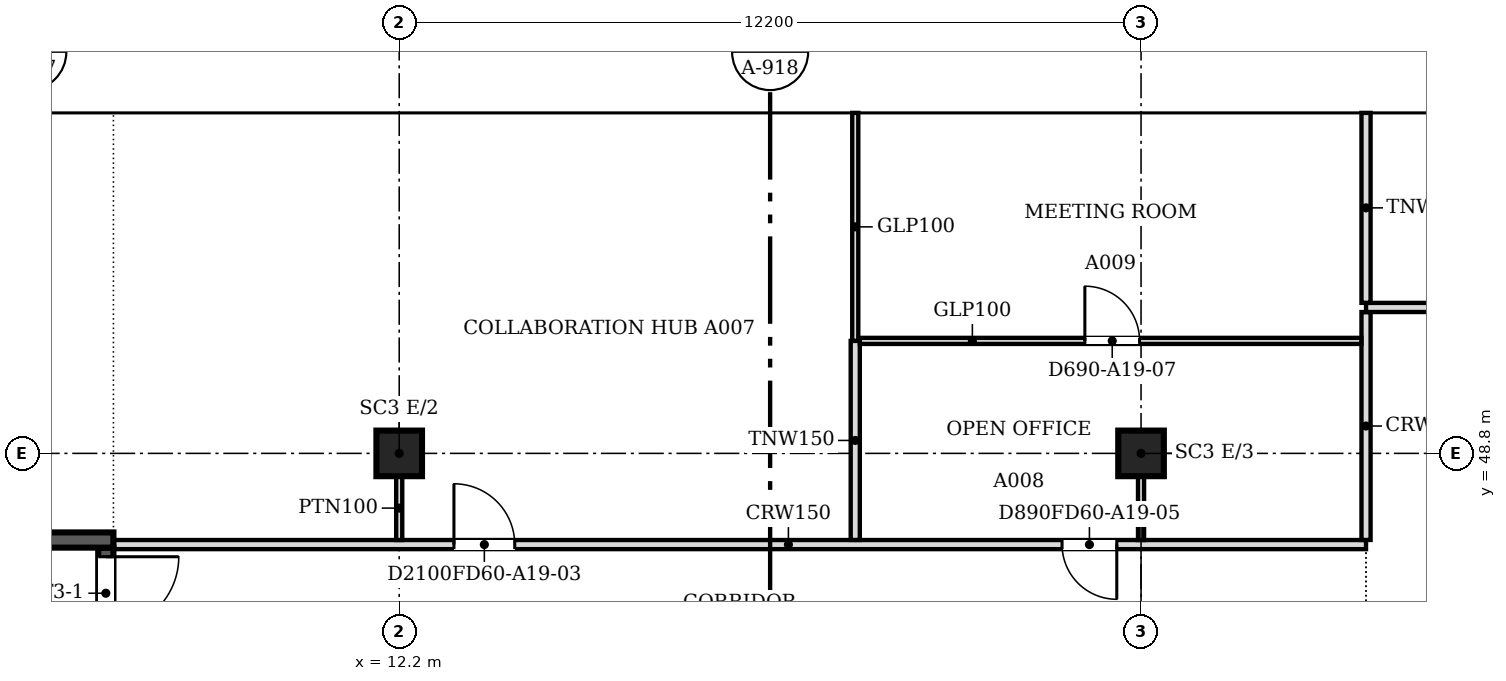
"""IFC4 building model, lengths in metres.
Left out: names, types, materials, properties, quantities, classifications, styles, units other than length and angle.
Written with IfcOpenShell. Run it as: python <this file> out.ifc"""

import sys

from ifc_helpers import new_model, si_unit, direction, frame, frame_2d, origin, origin_2d, place, context, subcontext, project, spatial, polyline, rectangle, outline, extrude, faceted_brep, source, transform, mapped, element, fill, save


model = new_model("IFC4")
c1 = context("Model", 3, precision=1e-05, world=origin(), true_north=direction((0.0, 1.0)))
c2 = subcontext(c1, "Body", "Model", "MODEL_VIEW")
j1 = project(units=[si_unit("LENGTHUNIT", "METRE"), si_unit("PLANEANGLEUNIT", "RADIAN")], contexts=[c1])
p1 = place(None, origin())
s1 = spatial("IfcSite", under=j1, at=p1, CompositionType="ELEMENT")
p2 = place(p1, origin())
s2 = spatial("IfcBuilding", under=s1, at=p2, CompositionType="ELEMENT")
p3 = place(p2, frame((0.0, 0.0, 209.3)))
s3 = spatial("IfcBuildingStorey", under=s2, at=p3, CompositionType="ELEMENT", Elevation=209.3)
for number, where, z_axis, x_axis in (
    (1, (12.2, 48.8, 0.0), (0.0, 0.0, 1.0), (1.0, 0.0, 0.0)),
    (2, (24.4, 48.8, 0.0), (0.0, 0.0, 1.0), (1.0, 0.0, 0.0)),
):
    element("IfcColumn", number, at=place(p3, frame(where, z_axis=z_axis, x_axis=x_axis)), inside=s3, PredefinedType="COLUMN", context=c2, shape_type="SweptSolid", body=[
        extrude(rectangle(XDim=0.75, YDim=0.75, at=origin_2d()), origin(), (0.0, 0.0, 1.0), 3.6),
    ])
m1 = source(origin(), c2, "Body", "SweptSolid", [
    extrude(outline(polyline([(3.05, 0.0), (6.1, 3.8), (3.05, 7.6), (0.0, 3.8), (3.05, 0.0)])), frame((0.0, 0.25, 0.0), z_axis=(0.0, -1.0, 0.0), x_axis=(1.0, 0.0, 0.0)), (0.0, 0.0, 1.0), 0.5),
])
p4 = place(p3, frame((30.5, 54.65, -3.8), z_axis=(0.0, 0.0, 1.0), x_axis=(-1.0, 0.0, 0.0)))
e3 = element("IfcWall", 3, at=p4, inside=s3, PredefinedType="SOLIDWALL", context=c2, shape_type="MappedRepresentation", body=[
    mapped(m1, transform((0.0, 0.0, 0.0), scale=1.0)),
])
m2 = source(origin(), c2, "Body", "SweptSolid", [
    extrude(outline(polyline([(3.05, 0.399), (5.78, 3.8), (3.05, 7.201), (0.321, 3.8), (3.05, 0.399)])), frame((0.0, 0.26, 0.0), z_axis=(0.0, -1.0, 0.0), x_axis=(1.0, 0.0, 0.0)), (0.0, 0.0, 1.0), 0.52),
])
p5 = place(p4, origin())
e4 = element("IfcOpeningElement", 4, at=p5, cuts=e3, PredefinedType="OPENING", context=c2, shape_type="MappedRepresentation", body=[
    mapped(m2, transform((0.0, 0.0, 0.0), scale=1.0)),
])
m3 = source(origin(), c2, "Body", "Brep", [
    faceted_brep([(3.05, -0.25, 0.0), (6.1, -0.25, 3.8), (6.1, -0.25, 3.8), (3.05, -0.25, 7.6), (0.0, -0.25, 3.8), (0.0, 0.25, 3.8), (3.05, 0.25, 7.6), (6.1, 0.25, 3.8), (6.1, 0.25, 3.8), (3.05, 0.25, 0.0)], [[[0, 1, 2, 3, 4]], [[5, 6, 7, 8, 9]], [[9, 8, 1, 0]], [[7, 6, 3, 2]], [[6, 5, 4, 3]], [[5, 9, 0, 4]], [[1, 8, 7, 2]]]),
])
p6 = place(p3, frame((24.4, 54.65, -3.8), z_axis=(0.0, 0.0, 1.0), x_axis=(-1.0, 0.0, 0.0)))
e5 = element("IfcWall", 5, at=p6, inside=s3, PredefinedType="SOLIDWALL", context=c2, shape_type="MappedRepresentation", body=[
    mapped(m3, transform((0.0, 0.0, 0.0), scale=1.0)),
])
p7 = place(p6, origin())
e6 = element("IfcOpeningElement", 6, at=p7, cuts=e5, PredefinedType="OPENING", context=c2, shape_type="MappedRepresentation", body=[
    mapped(m2, transform((0.0, 0.0, 0.0), scale=1.0)),
])
p8 = place(p3, frame((18.3, 54.65, -3.8), z_axis=(0.0, 0.0, 1.0), x_axis=(-1.0, 0.0, 0.0)))
e7 = element("IfcWall", 7, at=p8, inside=s3, PredefinedType="SOLIDWALL", context=c2, shape_type="MappedRepresentation", body=[
    mapped(m1, transform((0.0, 0.0, 0.0), scale=1.0)),
])
p9 = place(p8, origin())
e8 = element("IfcOpeningElement", 8, at=p9, cuts=e7, PredefinedType="OPENING", context=c2, shape_type="MappedRepresentation", body=[
    mapped(m2, transform((0.0, 0.0, 0.0), scale=1.0)),
])
m4 = source(origin(), c2, "Body", "Brep", [
    faceted_brep([(3.05, -0.25, 0.0), (6.053, -0.25, 3.8), (3.05, -0.25, 7.6), (0.0, -0.25, 3.8), (0.0, 0.25, 3.8), (3.05, 0.25, 7.6), (6.007, 0.25, 3.859), (6.007, 0.25, 3.741), (3.05, 0.25, 0.0), (6.053, 0.0, 3.8)], [[[0, 1, 2, 3]], [[4, 5, 6, 7, 8]], [[8, 7, 9, 1, 0]], [[6, 5, 2, 1, 9]], [[5, 4, 3, 2]], [[4, 8, 0, 3]], [[9, 7, 6]]]),
])
p10 = place(p3, frame((12.2, 54.65, -3.8), z_axis=(0.0, 0.0, 1.0), x_axis=(-1.0, 0.0, 0.0)))
e9 = element("IfcWall", 9, at=p10, inside=s3, PredefinedType="SOLIDWALL", context=c2, shape_type="MappedRepresentation", body=[
    mapped(m4, transform((0.0, 0.0, 0.0), scale=1.0)),
])
m5 = source(origin(), c2, "Body", "SweptSolid", [
    extrude(outline(polyline([(3.049, 0.401), (5.735, 3.8), (3.049, 7.199), (0.321, 3.8), (3.049, 0.401)])), frame((0.0, 0.26, 0.0), z_axis=(0.0, -1.0, 0.0), x_axis=(1.0, 0.0, 0.0)), (0.0, 0.0, 1.0), 0.52),
])
p11 = place(p10, origin())
e10 = element("IfcOpeningElement", 10, at=p11, cuts=e9, PredefinedType="OPENING", context=c2, shape_type="MappedRepresentation", body=[
    mapped(m5, transform((0.0, 0.0, 0.0), scale=1.0)),
])
p12 = place(p2, frame((0.0, 0.0, 213.1)))
s4 = spatial("IfcBuildingStorey", under=s2, at=p12, CompositionType="ELEMENT", Elevation=213.1)
m6 = source(origin(), c2, "Body", "SweptSolid", [
    extrude(outline(polyline([(3.05, 0.0), (6.1, 3.8), (3.05, 7.6), (0.0, 3.8), (3.05, 0.0)])), frame((0.0, 0.25, 0.0), z_axis=(0.0, -1.0, 0.0), x_axis=(1.0, 0.0, 0.0)), (0.0, 0.0, 1.0), 0.5),
])
p13 = place(p12, frame((33.55, 54.65, -3.8), z_axis=(0.0, 0.0, 1.0), x_axis=(-1.0, 0.0, 0.0)))
e11 = element("IfcWall", 11, at=p13, inside=s4, PredefinedType="SOLIDWALL", context=c2, shape_type="MappedRepresentation", body=[
    mapped(m6, transform((0.0, 0.0, 0.0), scale=1.0)),
])
m7 = source(origin(), c2, "Body", "SweptSolid", [
    extrude(outline(polyline([(3.05, 0.399), (5.78, 3.8), (3.05, 7.2), (0.321, 3.8), (3.05, 0.399)])), frame((0.0, 0.26, 0.0), z_axis=(0.0, -1.0, 0.0), x_axis=(1.0, 0.0, 0.0)), (0.0, 0.0, 1.0), 0.52),
])
p14 = place(p13, origin())
e12 = element("IfcOpeningElement", 12, at=p14, cuts=e11, PredefinedType="OPENING", context=c2, shape_type="MappedRepresentation", body=[
    mapped(m7, transform((0.0, 0.0, 0.0), scale=1.0)),
])
m8 = source(origin(), c2, "Body", "Brep", [
    faceted_brep([(3.05, -0.25, 0.0), (6.1, -0.25, 3.8), (6.1, -0.25, 3.8), (3.05, -0.25, 7.6), (0.0, -0.25, 3.8), (0.0, 0.25, 3.8), (3.05, 0.25, 7.6), (6.1, 0.25, 3.8), (6.1, 0.25, 3.8), (3.05, 0.25, 0.0)], [[[0, 1, 2, 3, 4]], [[5, 6, 7, 8, 9]], [[9, 8, 1, 0]], [[7, 6, 3, 2]], [[6, 5, 4, 3]], [[5, 9, 0, 4]], [[1, 8, 7, 2]]]),
])
p15 = place(p12, frame((27.45, 54.65, -3.8), z_axis=(0.0, 0.0, 1.0), x_axis=(-1.0, 0.0, 0.0)))
e13 = element("IfcWall", 13, at=p15, inside=s4, PredefinedType="SOLIDWALL", context=c2, shape_type="MappedRepresentation", body=[
    mapped(m8, transform((0.0, 0.0, 0.0), scale=1.0)),
])
p16 = place(p15, origin())
e14 = element("IfcOpeningElement", 14, at=p16, cuts=e13, PredefinedType="OPENING", context=c2, shape_type="MappedRepresentation", body=[
    mapped(m7, transform((0.0, 0.0, 0.0), scale=1.0)),
])
p17 = place(p12, frame((21.35, 54.65, -3.8), z_axis=(0.0, 0.0, 1.0), x_axis=(-1.0, 0.0, 0.0)))
e15 = element("IfcWall", 15, at=p17, inside=s4, PredefinedType="SOLIDWALL", context=c2, shape_type="MappedRepresentation", body=[
    mapped(m6, transform((0.0, 0.0, 0.0), scale=1.0)),
])
p18 = place(p17, origin())
e16 = element("IfcOpeningElement", 16, at=p18, cuts=e15, PredefinedType="OPENING", context=c2, shape_type="MappedRepresentation", body=[
    mapped(m7, transform((0.0, 0.0, 0.0), scale=1.0)),
])
p19 = place(p12, frame((15.25, 54.65, -3.8), z_axis=(0.0, 0.0, 1.0), x_axis=(-1.0, 0.0, 0.0)))
e17 = element("IfcWall", 17, at=p19, inside=s4, PredefinedType="SOLIDWALL", context=c2, shape_type="MappedRepresentation", body=[
    mapped(m6, transform((0.0, 0.0, 0.0), scale=1.0)),
])
p20 = place(p19, origin())
e18 = element("IfcOpeningElement", 18, at=p20, cuts=e17, PredefinedType="OPENING", context=c2, shape_type="MappedRepresentation", body=[
    mapped(m7, transform((0.0, 0.0, 0.0), scale=1.0)),
])
m9 = source(origin(), c2, "Body", "Brep", [
    faceted_brep([(3.003, -0.25, 0.0), (3.05, -0.25, 0.06), (3.05, -0.25, 7.54), (3.003, -0.25, 7.6), (0.0, -0.25, 3.8), (0.0, 0.25, 3.8), (2.957, 0.25, 7.541), (2.957, 0.25, 0.059), (3.003, 0.0, 0.0), (3.003, 0.0, 7.6)], [[[0, 1, 2, 3, 4]], [[5, 6, 7]], [[1, 0, 8]], [[9, 3, 2]], [[6, 5, 4, 3, 9]], [[5, 7, 8, 0, 4]], [[1, 8, 7, 6, 9, 2]]]),
])
p21 = place(p12, frame((9.15, 54.65, -3.8), z_axis=(0.0, 0.0, 1.0), x_axis=(-1.0, 0.0, 0.0)))
e19 = element("IfcWall", 19, at=p21, inside=s4, PredefinedType="SOLIDWALL", context=c2, shape_type="MappedRepresentation", body=[
    mapped(m9, transform((0.0, 0.0, 0.0), scale=1.0)),
])
m10 = source(origin(), c2, "Body", "SweptSolid", [
    extrude(outline(polyline([(2.803, 6.944), (0.319, 3.8), (2.803, 0.656), (2.803, 6.944)])), frame((0.0, 0.26, 0.0), z_axis=(0.0, -1.0, 0.0), x_axis=(1.0, 0.0, 0.0)), (0.0, 0.0, 1.0), 0.52),
])
p22 = place(p21, origin())
e20 = element("IfcOpeningElement", 20, at=p22, cuts=e19, PredefinedType="OPENING", context=c2, shape_type="MappedRepresentation", body=[
    mapped(m10, transform((0.0, 0.0, 0.0), scale=1.0)),
])
p23 = place(p3, frame((3.6, 47.375, 0.0), z_axis=(0.0, 0.0, 1.0), x_axis=(1.0, 0.0, 0.0)))
e21 = element("IfcWall", 21, at=p23, inside=s3, PredefinedType="SOLIDWALL", context=c2, shape_type="SweptSolid", body=[
    extrude(rectangle(XDim=3.9, YDim=0.25, at=frame_2d((1.95, 0.0))), origin(), (0.0, 0.0, 1.0), 3.8),
])
p24 = place(p3, frame((7.375, 47.25, 0.0), z_axis=(0.0, 0.0, 1.0), x_axis=(0.0, -1.0, 0.0)))
e22 = element("IfcWall", 22, at=p24, inside=s3, PredefinedType="SOLIDWALL", context=c2, shape_type="SweptSolid", body=[
    extrude(rectangle(XDim=8.0, YDim=0.25, at=frame_2d((4.0, 0.0))), origin(), (0.0, 0.0, 1.0), 3.8),
])
m11 = source(origin(), c2, "Body", "SweptSolid", [
    extrude(rectangle(XDim=1.2, YDim=2.1, at=frame_2d((0.6, 1.05))), frame((0.0, 0.135, 0.0), z_axis=(0.0, -1.0, 0.0), x_axis=(1.0, 0.0, 0.0)), (0.0, 0.0, 1.0), 0.27),
])
p25 = place(p24, frame((0.15, 0.0, 0.0)))
e23 = element("IfcOpeningElement", 23, at=p25, cuts=e22, PredefinedType="OPENING", context=c2, shape_type="MappedRepresentation", body=[
    mapped(m11, transform((0.0, 0.0, 0.0), scale=1.0)),
])
p26 = place(p3, frame((7.5, 47.3, 0.0), z_axis=(0.0, 0.0, 1.0), x_axis=(1.0, 0.0, 0.0)))
e24 = element("IfcWall", 24, at=p26, inside=s3, PredefinedType="PARTITIONING", context=c2, shape_type="SweptSolid", body=[
    extrude(rectangle(XDim=20.6, YDim=0.15, at=frame_2d((10.3, 0.0))), origin(), (0.0, 0.0, 1.0), 3.067),
])
m12 = source(origin(), c2, "Body", "SweptSolid", [
    extrude(rectangle(XDim=0.9, YDim=2.1, at=frame_2d((0.45, 1.05))), frame((0.0, 0.085, 0.0), z_axis=(0.0, -1.0, 0.0), x_axis=(1.0, 0.0, 0.0)), (0.0, 0.0, 1.0), 0.17),
])
p27 = place(p26, frame((15.601, 0.0, 0.0)))
e25 = element("IfcOpeningElement", 25, at=p27, cuts=e24, PredefinedType="OPENING", context=c2, shape_type="MappedRepresentation", body=[
    mapped(m12, transform((0.0, 0.0, 0.0), scale=1.0)),
])
m13 = source(origin(), c2, "Body", "SweptSolid", [
    extrude(rectangle(XDim=1.0, YDim=2.1, at=frame_2d((0.5, 1.05))), frame((0.0, 0.085, 0.0), z_axis=(0.0, -1.0, 0.0), x_axis=(1.0, 0.0, 0.0)), (0.0, 0.0, 1.0), 0.17),
])
p28 = place(p26, frame((5.6, 0.0, 0.0)))
e26 = element("IfcOpeningElement", 26, at=p28, cuts=e24, PredefinedType="OPENING", context=c2, shape_type="MappedRepresentation", body=[
    mapped(m13, transform((0.0, 0.0, 0.0), scale=1.0)),
])
p29 = place(p3, frame((19.7, 47.376, 0.0), z_axis=(0.0, 0.0, 1.0), x_axis=(0.0, 1.0, 0.0)))
e27 = element("IfcWall", 27, at=p29, inside=s3, PredefinedType="PARTITIONING", context=c2, shape_type="SweptSolid", body=[
    extrude(rectangle(XDim=3.274, YDim=0.15, at=frame_2d((1.637, 0.0))), origin(), (0.0, 0.0, 1.0), 3.067),
])
p30 = place(p3, frame((28.1, 47.376, 0.0), z_axis=(0.0, 0.0, 1.0), x_axis=(0.0, 1.0, 0.0)))
e28 = element("IfcWall", 28, at=p30, inside=s3, PredefinedType="PARTITIONING", context=c2, shape_type="SweptSolid", body=[
    extrude(rectangle(XDim=3.748, YDim=0.15, at=frame_2d((1.874, 0.0))), origin(), (0.0, 0.0, 1.0), 3.067),
])
for number, where, z_axis, x_axis in (
    (29, (12.2, 48.425, 0.0), (0.0, 0.0, 1.0), (0.0, -1.0, 0.0)),
    (30, (24.4, 48.425, 0.0), (0.0, 0.0, 1.0), (0.0, -1.0, 0.0)),
):
    element("IfcWall", number, at=place(p3, frame(where, z_axis=z_axis, x_axis=x_axis)), inside=s3, PredefinedType="PARTITIONING", context=c2, shape_type="SweptSolid", body=[
        extrude(rectangle(XDim=1.05, YDim=0.1, at=frame_2d((0.525, 0.0))), origin(), (0.0, 0.0, 1.0), 3.067),
    ])
p31 = place(p3, frame((19.7, 50.651, 0.0), z_axis=(0.0, 0.0, 1.0), x_axis=(0.0, 1.0, 0.0)))
e31 = element("IfcWall", 31, at=p31, inside=s3, PredefinedType="PARTITIONING", context=c2, shape_type="SweptSolid", body=[
    extrude(rectangle(XDim=3.749, YDim=0.1, at=frame_2d((1.875, 0.0))), origin(), (0.0, 0.0, 1.0), 3.067),
])
p32 = place(p3, frame((19.776, 50.65, 0.0), z_axis=(0.0, 0.0, 1.0), x_axis=(1.0, 0.0, 0.0)))
e32 = element("IfcWall", 32, at=p32, inside=s3, PredefinedType="PARTITIONING", context=c2, shape_type="SweptSolid", body=[
    extrude(rectangle(XDim=8.248, YDim=0.1, at=frame_2d((4.124, 0.0))), origin(), (0.0, 0.0, 1.0), 3.067),
])
m14 = source(origin(), c2, "Body", "SweptSolid", [
    extrude(rectangle(XDim=0.9, YDim=2.1, at=frame_2d((0.45, 1.05))), frame((0.0, 0.06, 0.0), z_axis=(0.0, -1.0, 0.0), x_axis=(1.0, 0.0, 0.0)), (0.0, 0.0, 1.0), 0.12),
])
p33 = place(p32, frame((3.7, 0.0, 0.0)))
e33 = element("IfcOpeningElement", 33, at=p33, cuts=e32, PredefinedType="OPENING", context=c2, shape_type="MappedRepresentation", body=[
    mapped(m14, transform((0.0, 0.0, 0.0), scale=1.0)),
])
p34 = place(p3, frame((28.1, 51.2, 0.0), z_axis=(0.0, 0.0, 1.0), x_axis=(1.0, 0.0, 0.0)))
e34 = element("IfcWall", 34, at=p34, inside=s3, PredefinedType="PARTITIONING", context=c2, shape_type="SweptSolid", body=[
    extrude(rectangle(XDim=31.438, YDim=0.15, at=frame_2d((15.719, 0.0))), origin(), (0.0, 0.0, 1.0), 3.067),
])
p35 = place(p34, frame((27.501, 0.0, 0.0)))
e35 = element("IfcOpeningElement", 35, at=p35, cuts=e34, PredefinedType="OPENING", context=c2, shape_type="MappedRepresentation", body=[
    mapped(m12, transform((0.0, 0.0, 0.0), scale=1.0)),
])
p36 = place(p34, frame((5.6, 0.0, 0.0)))
e36 = element("IfcOpeningElement", 36, at=p36, cuts=e34, PredefinedType="OPENING", context=c2, shape_type="MappedRepresentation", body=[
    mapped(m12, transform((0.0, 0.0, 0.0), scale=1.0)),
])
p37 = place(p34, frame((17.8, 0.0, 0.0)))
e37 = element("IfcOpeningElement", 37, at=p37, cuts=e34, PredefinedType="OPENING", context=c2, shape_type="MappedRepresentation", body=[
    mapped(m12, transform((0.0, 0.0, 0.0), scale=1.0)),
])
p38 = place(p3, frame((28.1, 51.276, 0.0), z_axis=(0.0, 0.0, 1.0), x_axis=(0.0, 1.0, 0.0)))
e38 = element("IfcWall", 38, at=p38, inside=s3, PredefinedType="PARTITIONING", context=c2, shape_type="SweptSolid", body=[
    extrude(rectangle(XDim=3.124, YDim=0.15, at=frame_2d((1.562, 0.0))), origin(), (0.0, 0.0, 1.0), 3.067),
])
m15 = source(origin(), c2, "Body", "SweptSolid", [
    extrude(rectangle(XDim=1.2, YDim=2.1, at=frame_2d((0.6, 1.05))), frame((0.0, 0.025, 0.0), z_axis=(0.0, -1.0, 0.0), x_axis=(1.0, 0.0, 0.0)), (0.0, 0.0, 1.0), 0.05),
])
p39 = place(p25, origin())
e39 = element("IfcDoor", 39, at=p39, inside=s3, OperationType="SINGLE_SWING_LEFT", PredefinedType="DOOR", context=c2, shape_type="MappedRepresentation", body=[
    mapped(m15, transform((0.0, 0.0, 0.0), scale=1.0)),
])
fill(e23, e39)
m16 = source(origin(), c2, "Body", "SweptSolid", [
    extrude(rectangle(XDim=0.9, YDim=2.1, at=frame_2d((0.45, 1.05))), frame((0.0, 0.025, 0.0), z_axis=(0.0, -1.0, 0.0), x_axis=(1.0, 0.0, 0.0)), (0.0, 0.0, 1.0), 0.05),
])
p40 = place(p33, origin())
e40 = element("IfcDoor", 40, at=p40, inside=s3, OperationType="SINGLE_SWING_LEFT", PredefinedType="DOOR", context=c2, shape_type="MappedRepresentation", body=[
    mapped(m16, transform((0.0, 0.0, 0.0), scale=1.0)),
])
fill(e33, e40)
p41 = place(p27, origin())
e41 = element("IfcDoor", 41, at=p41, inside=s3, OperationType="SINGLE_SWING_RIGHT", PredefinedType="DOOR", context=c2, shape_type="MappedRepresentation", body=[
    mapped(m16, transform((0.0, 0.0, 0.0), scale=1.0)),
])
fill(e25, e41)
m17 = source(origin(), c2, "Body", "SweptSolid", [
    extrude(rectangle(XDim=1.0, YDim=2.1, at=frame_2d((0.5, 1.05))), frame((0.0, 0.025, 0.0), z_axis=(0.0, -1.0, 0.0), x_axis=(1.0, 0.0, 0.0)), (0.0, 0.0, 1.0), 0.05),
])
p42 = place(p28, origin())
e42 = element("IfcDoor", 42, at=p42, inside=s3, OperationType="SINGLE_SWING_LEFT", PredefinedType="DOOR", context=c2, shape_type="MappedRepresentation", body=[
    mapped(m17, transform((0.0, 0.0, 0.0), scale=1.0)),
])
fill(e26, e42)
save(model, sys.argv[1])
